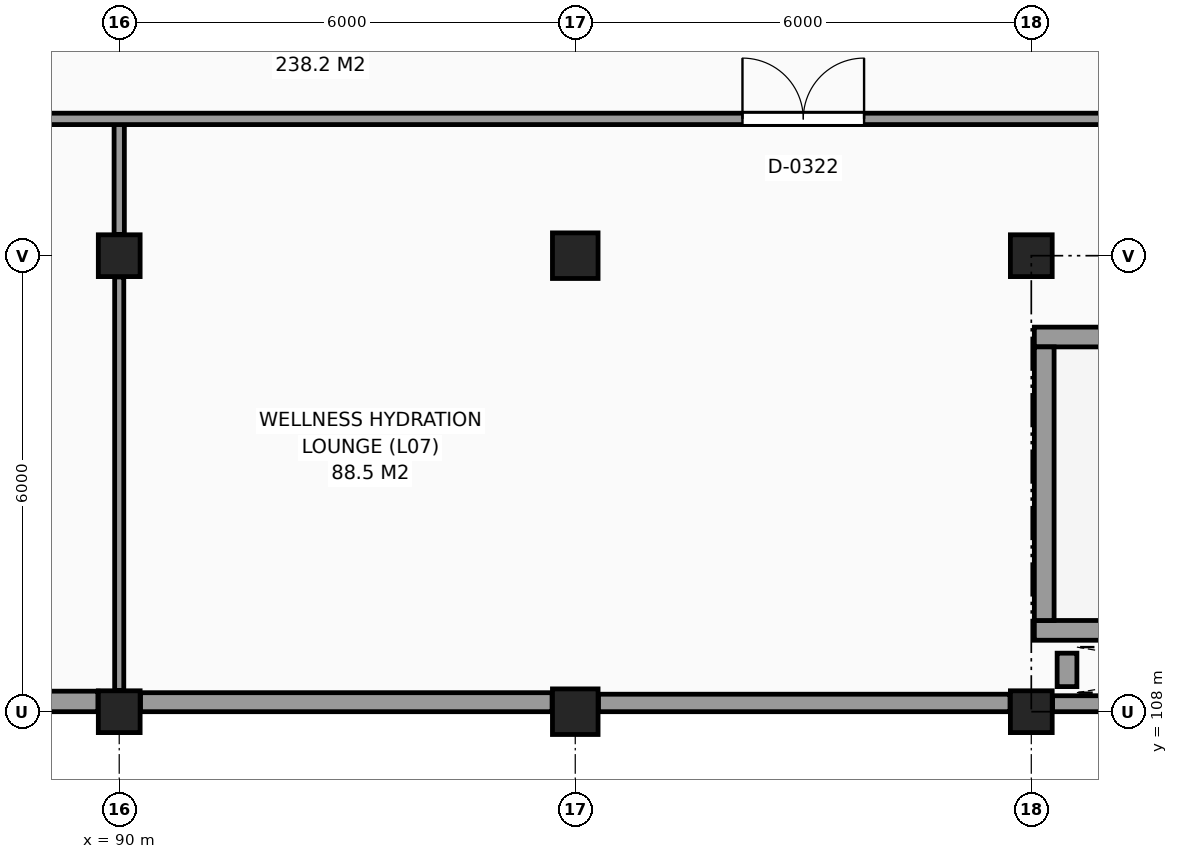
"""IFC4 building model, lengths in metres.
Left out: names, types, materials, properties, quantities, classifications, styles, units other than length and angle.
Written with IfcOpenShell. Run it as: python <this file> out.ifc"""

import sys

from ifc_helpers import new_model, si_unit, direction, frame, frame_2d, origin, origin_2d, place, context, subcontext, project, spatial, rectangle, extrude, element, fill, save


model = new_model("IFC4")
c1 = context("Model", 3, precision=1e-05, world=origin(), true_north=direction((0.0, 1.0)))
c2 = subcontext(c1, "Body", "Model", "MODEL_VIEW")
j1 = project(units=[si_unit("LENGTHUNIT", "METRE"), si_unit("PLANEANGLEUNIT", "RADIAN")], contexts=[c1])
p1 = place(None, origin())
s1 = spatial("IfcSite", under=j1, at=p1, CompositionType="ELEMENT")
p2 = place(p1, origin())
s2 = spatial("IfcBuilding", under=s1, at=p2, CompositionType="ELEMENT")
p3 = place(p2, frame((0.0, 0.0, 31.5)))
s3 = spatial("IfcBuildingStorey", under=s2, at=p3, CompositionType="ELEMENT", Elevation=31.5)
for number, where, z_axis, x_axis in (
    (1, (90.0, 108.0, 0.0), (0.0, 0.0, 1.0), (1.0, 0.0, 0.0)),
    (2, (90.0, 114.0, 0.0), (0.0, 0.0, 1.0), (1.0, 0.0, 0.0)),
):
    element("IfcColumn", number, at=place(p3, frame(where, z_axis=z_axis, x_axis=x_axis)), inside=s3, PredefinedType="COLUMN", context=c2, shape_type="SweptSolid", body=[
        extrude(rectangle(XDim=0.55, YDim=0.55, at=origin_2d()), origin(), (0.0, 0.0, 1.0), 3.3),
    ])
for number, where, z_axis, x_axis in (
    (3, (96.0, 108.0, 0.0), (0.0, 0.0, 1.0), (1.0, 0.0, 0.0)),
    (4, (96.0, 114.0, 0.0), (0.0, 0.0, 1.0), (1.0, 0.0, 0.0)),
):
    element("IfcColumn", number, at=place(p3, frame(where, z_axis=z_axis, x_axis=x_axis)), inside=s3, PredefinedType="COLUMN", context=c2, shape_type="SweptSolid", body=[
        extrude(rectangle(XDim=0.6, YDim=0.6, at=origin_2d()), origin(), (0.0, 0.0, 1.0), 3.3),
    ])
for number, where, z_axis, x_axis in (
    (5, (102.0, 108.0, 0.0), (0.0, 0.0, 1.0), (1.0, 0.0, 0.0)),
    (6, (102.0, 114.0, 0.0), (0.0, 0.0, 1.0), (1.0, 0.0, 0.0)),
):
    element("IfcColumn", number, at=place(p3, frame(where, z_axis=z_axis, x_axis=x_axis)), inside=s3, PredefinedType="COLUMN", context=c2, shape_type="SweptSolid", body=[
        extrude(rectangle(XDim=0.55, YDim=0.55, at=origin_2d()), origin(), (0.0, 0.0, 1.0), 3.3),
    ])
p4 = place(p3, frame((84.305, 108.135, 0.0), z_axis=(0.0, 0.0, 1.0), x_axis=(1.0, 0.0, 0.0)))
e7 = element("IfcWall", 7, at=p4, inside=s3, PredefinedType="SOLIDWALL", context=c2, shape_type="SweptSolid", body=[
    extrude(rectangle(XDim=5.415, YDim=0.27, at=frame_2d((2.708, 0.0))), origin(), (0.0, 0.0, 1.0), 2.42),
])
p5 = place(p3, frame((90.28, 108.125, 0.0), z_axis=(0.0, 0.0, 1.0), x_axis=(1.0, 0.0, 0.0)))
e8 = element("IfcWall", 8, at=p5, inside=s3, PredefinedType="SOLIDWALL", context=c2, shape_type="SweptSolid", body=[
    extrude(rectangle(XDim=5.415, YDim=0.25, at=frame_2d((2.708, 0.0))), origin(), (0.0, 0.0, 1.0), 2.42),
])
p6 = place(p3, frame((96.305, 108.115, 0.0), z_axis=(0.0, 0.0, 1.0), x_axis=(1.0, 0.0, 0.0)))
e9 = element("IfcWall", 9, at=p6, inside=s3, PredefinedType="SOLIDWALL", context=c2, shape_type="SweptSolid", body=[
    extrude(rectangle(XDim=5.415, YDim=0.23, at=frame_2d((2.708, 0.0))), origin(), (0.0, 0.0, 1.0), 2.42),
])
p7 = place(p3, frame((102.28, 108.105, 0.0), z_axis=(0.0, 0.0, 1.0), x_axis=(1.0, 0.0, 0.0)))
e10 = element("IfcWall", 10, at=p7, inside=s3, PredefinedType="SOLIDWALL", context=c2, shape_type="SweptSolid", body=[
    extrude(rectangle(XDim=5.415, YDim=0.21, at=frame_2d((2.708, 0.0))), origin(), (0.0, 0.0, 1.0), 3.07),
])
for number, where, z_axis, x_axis in (
    (11, (102.04, 109.07, 0.0), (0.0, 0.0, 1.0), (1.0, 0.0, 0.0)),
    (12, (102.04, 112.93, 0.0), (0.0, 0.0, 1.0), (1.0, 0.0, 0.0)),
):
    element("IfcWall", number, at=place(p3, frame(where, z_axis=z_axis, x_axis=x_axis)), inside=s3, PredefinedType="SHEAR", context=c2, shape_type="SweptSolid", body=[
        extrude(rectangle(XDim=10.72, YDim=0.26, at=frame_2d((5.36, 0.0))), origin(), (0.0, 0.0, 1.0), 3.3),
    ])
p8 = place(p3, frame((102.17, 109.2, 0.0), z_axis=(0.0, 0.0, 1.0), x_axis=(0.0, 1.0, 0.0)))
e13 = element("IfcWall", 13, at=p8, inside=s3, PredefinedType="SHEAR", context=c2, shape_type="SweptSolid", body=[
    extrude(rectangle(XDim=3.6, YDim=0.26, at=frame_2d((1.8, 0.0))), origin(), (0.0, 0.0, 1.0), 3.3),
])
p9 = place(p3, frame((102.47, 108.33, 0.0), z_axis=(0.0, 0.0, 1.0), x_axis=(0.0, 1.0, 0.0)))
e14 = element("IfcWall", 14, at=p9, inside=s3, PredefinedType="SHEAR", context=c2, shape_type="SweptSolid", body=[
    extrude(rectangle(XDim=0.44, YDim=0.26, at=frame_2d((0.22, 0.0))), origin(), (0.0, 0.0, 1.0), 3.3),
])
p10 = place(p3, frame((90.0, 108.28, 0.0), z_axis=(0.0, 0.0, 1.0), x_axis=(0.0, 1.0, 0.0)))
e15 = element("IfcWall", 15, at=p10, inside=s3, PredefinedType="PARTITIONING", context=c2, shape_type="SweptSolid", body=[
    extrude(rectangle(XDim=5.44, YDim=0.12, at=frame_2d((2.72, 0.0))), origin(), (0.0, 0.0, 1.0), 2.37),
])
p11 = place(p3, frame((90.0, 114.28, 0.0), z_axis=(0.0, 0.0, 1.0), x_axis=(0.0, 1.0, 0.0)))
e16 = element("IfcWall", 16, at=p11, inside=s3, PredefinedType="PARTITIONING", context=c2, shape_type="SweptSolid", body=[
    extrude(rectangle(XDim=1.52, YDim=0.135, at=frame_2d((0.76, 0.0))), origin(), (0.0, 0.0, 1.0), 2.52),
])
p12 = place(p3, frame((66.215, 115.8, 0.0), z_axis=(0.0, 0.0, 1.0), x_axis=(1.0, 0.0, 0.0)))
e17 = element("IfcWall", 17, at=p12, inside=s3, PredefinedType="PARTITIONING", context=c2, shape_type="SweptSolid", body=[
    extrude(rectangle(XDim=103.585, YDim=0.15, at=frame_2d((51.792, 0.0))), origin(), (0.0, 0.0, 1.0), 3.07),
])
p13 = place(p12, frame((80.185, 0.0, 0.0)))
e18 = element("IfcOpeningElement", 18, at=p13, cuts=e17, PredefinedType="OPENING", context=c2, shape_type="SweptSolid", body=[
    extrude(rectangle(XDim=1.2, YDim=2.2, at=frame_2d((0.6, 1.1))), frame((0.0, 0.085, 0.0), z_axis=(0.0, -1.0, 0.0), x_axis=(1.0, 0.0, 0.0)), (0.0, 0.0, 1.0), 0.17),
])
p14 = place(p12, frame((50.185, 0.0, 0.0)))
e19 = element("IfcOpeningElement", 19, at=p14, cuts=e17, PredefinedType="OPENING", context=c2, shape_type="SweptSolid", body=[
    extrude(rectangle(XDim=1.2, YDim=2.2, at=frame_2d((0.6, 1.1))), frame((0.0, 0.085, 0.0), z_axis=(0.0, -1.0, 0.0), x_axis=(1.0, 0.0, 0.0)), (0.0, 0.0, 1.0), 0.17),
])
p15 = place(p12, frame((9.035, 0.0, 0.0)))
e20 = element("IfcOpeningElement", 20, at=p15, cuts=e17, PredefinedType="OPENING", context=c2, shape_type="SweptSolid", body=[
    extrude(rectangle(XDim=1.1, YDim=2.15, at=frame_2d((0.55, 1.075))), frame((0.0, 0.085, 0.0), z_axis=(0.0, -1.0, 0.0), x_axis=(1.0, 0.0, 0.0)), (0.0, 0.0, 1.0), 0.17),
])
p16 = place(p12, frame((55.335, 0.0, 0.0)))
e21 = element("IfcOpeningElement", 21, at=p16, cuts=e17, PredefinedType="OPENING", context=c2, shape_type="SweptSolid", body=[
    extrude(rectangle(XDim=1.0, YDim=2.15, at=frame_2d((0.5, 1.075))), frame((0.0, 0.085, 0.0), z_axis=(0.0, -1.0, 0.0), x_axis=(1.0, 0.0, 0.0)), (0.0, 0.0, 1.0), 0.17),
])
p17 = place(p12, frame((62.305, 0.0, 0.0)))
e22 = element("IfcOpeningElement", 22, at=p17, cuts=e17, PredefinedType="OPENING", context=c2, shape_type="SweptSolid", body=[
    extrude(rectangle(XDim=0.96, YDim=2.15, at=frame_2d((0.48, 1.075))), frame((0.0, 0.085, 0.0), z_axis=(0.0, -1.0, 0.0), x_axis=(1.0, 0.0, 0.0)), (0.0, 0.0, 1.0), 0.17),
])
p18 = place(p12, frame((31.985, 0.0, 0.0)))
e23 = element("IfcOpeningElement", 23, at=p18, cuts=e17, PredefinedType="OPENING", context=c2, shape_type="SweptSolid", body=[
    extrude(rectangle(XDim=1.6, YDim=2.25, at=frame_2d((0.8, 1.125))), frame((0.0, 0.085, 0.0), z_axis=(0.0, -1.0, 0.0), x_axis=(1.0, 0.0, 0.0)), (0.0, 0.0, 1.0), 0.17),
])
p19 = place(p12, frame((18.61, 0.0, 0.0)))
e24 = element("IfcOpeningElement", 24, at=p19, cuts=e17, PredefinedType="OPENING", context=c2, shape_type="SweptSolid", body=[
    extrude(rectangle(XDim=0.95, YDim=2.1, at=frame_2d((0.475, 1.05))), frame((0.0, 0.085, 0.0), z_axis=(0.0, -1.0, 0.0), x_axis=(1.0, 0.0, 0.0)), (0.0, 0.0, 1.0), 0.17),
])
p20 = place(p12, frame((84.51, 0.0, 0.0)))
e25 = element("IfcOpeningElement", 25, at=p20, cuts=e17, PredefinedType="OPENING", context=c2, shape_type="SweptSolid", body=[
    extrude(rectangle(XDim=0.95, YDim=2.1, at=frame_2d((0.475, 1.05))), frame((0.0, 0.085, 0.0), z_axis=(0.0, -1.0, 0.0), x_axis=(1.0, 0.0, 0.0)), (0.0, 0.0, 1.0), 0.17),
])
p21 = place(p18, origin())
e26 = element("IfcDoor", 26, at=p21, inside=s3, OperationType="DOUBLE_DOOR_SINGLE_SWING", PredefinedType="DOOR", context=c2, shape_type="SweptSolid", body=[
    extrude(rectangle(XDim=1.6, YDim=2.25, at=frame_2d((0.8, 1.125))), frame((0.0, 0.025, 0.0), z_axis=(0.0, -1.0, 0.0), x_axis=(1.0, 0.0, 0.0)), (0.0, 0.0, 1.0), 0.05),
])
fill(e23, e26)
save(model, sys.argv[1])
